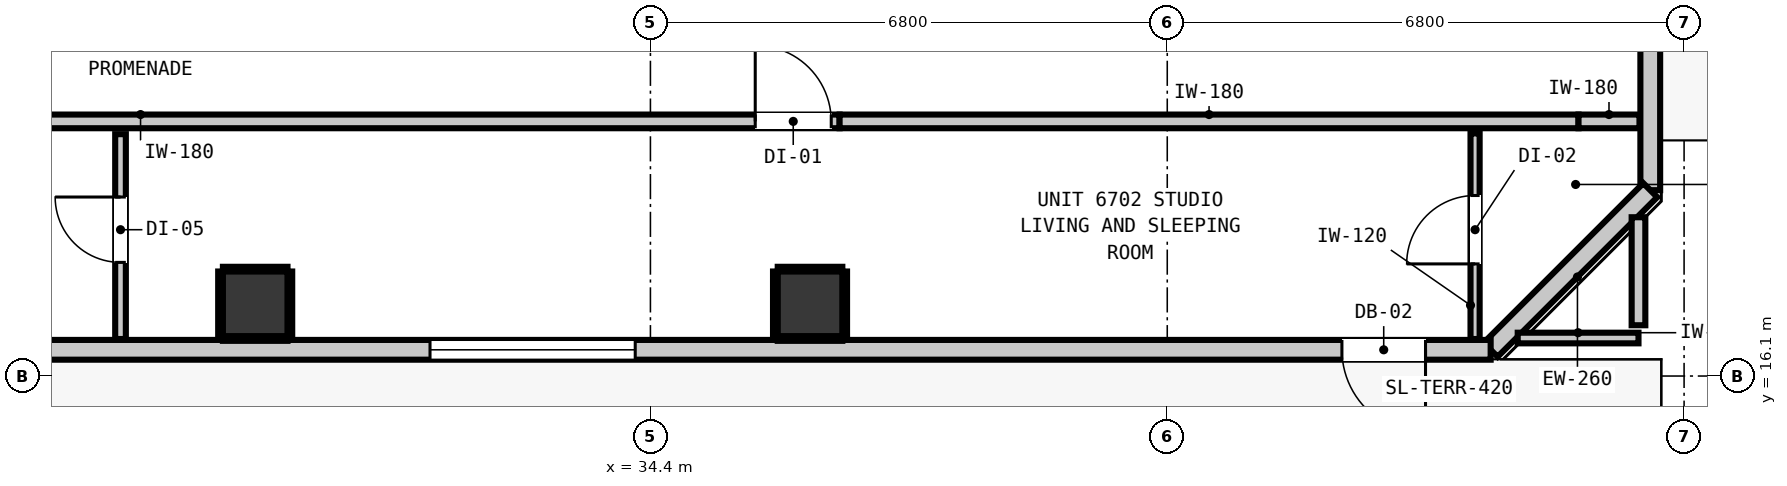
"""IFC4 building model, lengths in metres.
Left out: names, types, materials, properties, quantities, classifications, styles, units other than length and angle.
Written with IfcOpenShell. Run it as: python <this file> out.ifc"""

import sys

from ifc_helpers import new_model, si_unit, direction, frame, frame_2d, origin, origin_2d, place, context, subcontext, project, spatial, rectangle, extrude, element, fill, save


model = new_model("IFC4")
c1 = context("Model", 3, precision=1e-05, world=origin(), true_north=direction((0.0, 1.0)))
c2 = subcontext(c1, "Body", "Model", "MODEL_VIEW")
j1 = project(units=[si_unit("LENGTHUNIT", "METRE"), si_unit("PLANEANGLEUNIT", "RADIAN")], contexts=[c1])
p1 = place(None, origin())
s1 = spatial("IfcSite", under=j1, at=p1, CompositionType="ELEMENT")
p2 = place(p1, origin())
s2 = spatial("IfcBuilding", under=s1, at=p2, CompositionType="ELEMENT")
p3 = place(p2, frame((0.0, 0.0, 231.28)))
s3 = spatial("IfcBuildingStorey", under=s2, at=p3, CompositionType="ELEMENT", Elevation=231.28)
for number, where, z_axis, x_axis in (
    (1, (29.2, 17.05, -0.2), (0.0, 0.0, 1.0), (1.0, 0.0, 0.0)),
    (2, (36.5, 17.05, -0.2), (0.0, 0.0, 1.0), (1.0, 0.0, 0.0)),
):
    element("IfcColumn", number, at=place(p3, frame(where, z_axis=z_axis, x_axis=x_axis)), inside=s3, PredefinedType="COLUMN", context=c2, shape_type="SweptSolid", body=[
        extrude(rectangle(XDim=0.85, YDim=0.85, at=origin_2d()), origin(), (0.0, 0.0, 1.0), 3.52),
    ])
p4 = place(p3, frame((47.555, 48.855, 0.0), z_axis=(0.0, 0.0, 1.0), x_axis=(0.0, -1.0, 0.0)))
e3 = element("IfcWall", 3, at=p4, inside=s3, PredefinedType="STANDARD", context=c2, shape_type="SweptSolid", body=[
    extrude(rectangle(XDim=30.31, YDim=0.26, at=frame_2d((15.155, 0.0))), origin(), (0.0, 0.0, 1.0), 3.1),
])
p5 = place(p4, frame((0.91, 0.0, 0.0)))
e4 = element("IfcOpeningElement", 4, at=p5, cuts=e3, PredefinedType="OPENING", context=c2, shape_type="SweptSolid", body=[
    extrude(rectangle(XDim=1.0, YDim=2.15, at=frame_2d((0.5, 1.075))), frame((0.0, 0.14, 0.0), z_axis=(0.0, -1.0, 0.0), x_axis=(1.0, 0.0, 0.0)), (0.0, 0.0, 1.0), 0.28),
])
p6 = place(p4, frame((3.107, 0.0, 0.85)))
e5 = element("IfcOpeningElement", 5, at=p6, cuts=e3, PredefinedType="OPENING", context=c2, shape_type="SweptSolid", body=[
    extrude(rectangle(XDim=2.7, YDim=2.0, at=frame_2d((1.35, 1.0))), frame((0.0, 0.14, 0.0), z_axis=(0.0, -1.0, 0.0), x_axis=(1.0, 0.0, 0.0)), (0.0, 0.0, 1.0), 0.28),
])
p7 = place(p3, frame((47.555, 18.545, 0.0), z_axis=(0.0, 0.0, 1.0), x_axis=(-0.707106781187, -0.707106781187, 0.0)))
e6 = element("IfcWall", 6, at=p7, inside=s3, PredefinedType="STANDARD", context=c2, shape_type="SweptSolid", body=[
    extrude(rectangle(XDim=2.97, YDim=0.26, at=frame_2d((1.485, 0.0))), origin(), (0.0, 0.0, 1.0), 3.1),
])
p8 = place(p3, frame((45.455, 16.445, 0.0), z_axis=(0.0, 0.0, 1.0), x_axis=(-1.0, 0.0, 0.0)))
e7 = element("IfcWall", 7, at=p8, inside=s3, PredefinedType="STANDARD", context=c2, shape_type="SweptSolid", body=[
    extrude(rectangle(XDim=32.71, YDim=0.26, at=frame_2d((16.355, 0.0))), origin(), (0.0, 0.0, 1.0), 3.1),
])
p9 = place(p8, frame((0.857, 0.0, 0.0)))
e8 = element("IfcOpeningElement", 8, at=p9, cuts=e7, PredefinedType="OPENING", context=c2, shape_type="SweptSolid", body=[
    extrude(rectangle(XDim=1.1, YDim=2.15, at=frame_2d((0.55, 1.075))), frame((0.0, 0.14, 0.0), z_axis=(0.0, -1.0, 0.0), x_axis=(1.0, 0.0, 0.0)), (0.0, 0.0, 1.0), 0.28),
])
p10 = place(p8, frame((26.377, 0.0, 0.85)))
e9 = element("IfcOpeningElement", 9, at=p10, cuts=e7, PredefinedType="OPENING", context=c2, shape_type="SweptSolid", body=[
    extrude(rectangle(XDim=2.7, YDim=2.0, at=frame_2d((1.35, 1.0))), frame((0.0, 0.14, 0.0), z_axis=(0.0, -1.0, 0.0), x_axis=(1.0, 0.0, 0.0)), (0.0, 0.0, 1.0), 0.28),
])
p11 = place(p8, frame((11.255, 0.0, 0.85)))
e10 = element("IfcOpeningElement", 10, at=p11, cuts=e7, PredefinedType="OPENING", context=c2, shape_type="SweptSolid", body=[
    extrude(rectangle(XDim=2.7, YDim=2.0, at=frame_2d((1.35, 1.0))), frame((0.0, 0.14, 0.0), z_axis=(0.0, -1.0, 0.0), x_axis=(1.0, 0.0, 0.0)), (0.0, 0.0, 1.0), 0.28),
])
p12 = place(p3, frame((10.787, 19.45, 0.0), z_axis=(0.0, 0.0, 1.0), x_axis=(1.0, 0.0, 0.0)))
e11 = element("IfcWall", 11, at=p12, inside=s3, PredefinedType="PARTITIONING", context=c2, shape_type="SweptSolid", body=[
    extrude(rectangle(XDim=26.102, YDim=0.18, at=frame_2d((13.051, 0.0))), origin(), (0.0, 0.0, 1.0), 3.1),
])
p13 = place(p12, frame((7.817, 0.0, 0.0)))
e12 = element("IfcOpeningElement", 12, at=p13, cuts=e11, PredefinedType="OPENING", context=c2, shape_type="SweptSolid", body=[
    extrude(rectangle(XDim=1.0, YDim=2.15, at=frame_2d((0.5, 1.075))), frame((0.0, 0.1, 0.0), z_axis=(0.0, -1.0, 0.0), x_axis=(1.0, 0.0, 0.0)), (0.0, 0.0, 1.0), 0.2),
])
p14 = place(p12, frame((24.992, 0.0, 0.0)))
e13 = element("IfcOpeningElement", 13, at=p14, cuts=e11, PredefinedType="OPENING", context=c2, shape_type="SweptSolid", body=[
    extrude(rectangle(XDim=1.0, YDim=2.15, at=frame_2d((0.5, 1.075))), frame((0.0, 0.1, 0.0), z_axis=(0.0, -1.0, 0.0), x_axis=(1.0, 0.0, 0.0)), (0.0, 0.0, 1.0), 0.2),
])
p15 = place(p3, frame((36.889, 19.45, 0.0), z_axis=(0.0, 0.0, 1.0), x_axis=(1.0, 0.0, 0.0)))
e14 = element("IfcWall", 14, at=p15, inside=s3, PredefinedType="PARTITIONING", context=c2, shape_type="SweptSolid", body=[
    extrude(rectangle(XDim=9.722, YDim=0.18, at=frame_2d((4.861, 0.0))), origin(), (0.0, 0.0, 1.0), 2.477),
])
p16 = place(p3, frame((46.611, 19.45, 0.0), z_axis=(0.0, 0.0, 1.0), x_axis=(1.0, 0.0, 0.0)))
e15 = element("IfcWall", 15, at=p16, inside=s3, PredefinedType="PARTITIONING", context=c2, shape_type="SweptSolid", body=[
    extrude(rectangle(XDim=0.802, YDim=0.18, at=frame_2d((0.401, 0.0))), origin(), (0.0, 0.0, 1.0), 3.1),
])
p17 = place(p3, frame((45.811, 16.6, 0.0), z_axis=(0.0, 0.0, 1.0), x_axis=(1.0, 0.0, 0.0)))
e16 = element("IfcWall", 16, at=p17, inside=s3, PredefinedType="PARTITIONING", context=c2, shape_type="SweptSolid", body=[
    extrude(rectangle(XDim=1.589, YDim=0.14, at=frame_2d((0.794, 0.0))), origin(), (0.0, 0.0, 1.0), 3.1),
])
p18 = place(p3, frame((47.4, 16.768, 0.0), z_axis=(0.0, 0.0, 1.0), x_axis=(0.0, 1.0, 0.0)))
e17 = element("IfcWall", 17, at=p18, inside=s3, PredefinedType="PARTITIONING", context=c2, shape_type="SweptSolid", body=[
    extrude(rectangle(XDim=1.421, YDim=0.18, at=frame_2d((0.71, 0.0))), origin(), (0.0, 0.0, 1.0), 3.1),
])
p19 = place(p3, frame((27.428, 16.587, 0.0), z_axis=(0.0, 0.0, 1.0), x_axis=(0.0, 1.0, 0.0)))
e18 = element("IfcWall", 18, at=p19, inside=s3, PredefinedType="PARTITIONING", context=c2, shape_type="SweptSolid", body=[
    extrude(rectangle(XDim=2.695, YDim=0.14, at=frame_2d((1.348, 0.0))), origin(), (0.0, 0.0, 1.0), 3.1),
])
p20 = place(p19, frame((1.008, 0.0, 0.0)))
e19 = element("IfcOpeningElement", 19, at=p20, cuts=e18, PredefinedType="OPENING", context=c2, shape_type="SweptSolid", body=[
    extrude(rectangle(XDim=0.86, YDim=2.02, at=frame_2d((0.43, 1.01))), frame((0.0, 0.08, 0.0), z_axis=(0.0, -1.0, 0.0), x_axis=(1.0, 0.0, 0.0)), (0.0, 0.0, 1.0), 0.16),
])
p21 = place(p3, frame((45.25, 16.587, 0.0), z_axis=(0.0, 0.0, 1.0), x_axis=(0.0, 1.0, 0.0)))
e20 = element("IfcWall", 20, at=p21, inside=s3, PredefinedType="PARTITIONING", context=c2, shape_type="SweptSolid", body=[
    extrude(rectangle(XDim=2.705, YDim=0.12, at=frame_2d((1.353, 0.0))), origin(), (0.0, 0.0, 1.0), 3.1),
])
p22 = place(p21, frame((0.988, 0.0, 0.0)))
e21 = element("IfcOpeningElement", 21, at=p22, cuts=e20, PredefinedType="OPENING", context=c2, shape_type="SweptSolid", body=[
    extrude(rectangle(XDim=0.9, YDim=2.1, at=frame_2d((0.45, 1.05))), frame((0.0, 0.07, 0.0), z_axis=(0.0, -1.0, 0.0), x_axis=(1.0, 0.0, 0.0)), (0.0, 0.0, 1.0), 0.14),
])
for number, where, z_axis, x_axis in (
    (22, (28.775, 16.593, 0.0), (0.0, 0.0, 1.0), (1.0, 0.0, 0.0)),
    (23, (28.775, 17.507, 0.0), (0.0, 0.0, 1.0), (1.0, 0.0, 0.0)),
    (24, (28.743, 16.625, 0.0), (0.0, 0.0, 1.0), (0.0, 1.0, 0.0)),
    (25, (29.657, 16.625, 0.0), (0.0, 0.0, 1.0), (0.0, 1.0, 0.0)),
    (26, (36.075, 16.593, 0.0), (0.0, 0.0, 1.0), (1.0, 0.0, 0.0)),
    (27, (36.075, 17.507, 0.0), (0.0, 0.0, 1.0), (1.0, 0.0, 0.0)),
    (28, (36.043, 16.625, 0.0), (0.0, 0.0, 1.0), (0.0, 1.0, 0.0)),
    (29, (36.957, 16.625, 0.0), (0.0, 0.0, 1.0), (0.0, 1.0, 0.0)),
):
    element("IfcWall", number, at=place(p3, frame(where, z_axis=z_axis, x_axis=x_axis)), inside=s3, PredefinedType="PARTITIONING", context=c2, shape_type="SweptSolid", body=[
        extrude(rectangle(XDim=0.85, YDim=0.06, at=frame_2d((0.425, 0.0))), origin(), (0.0, 0.0, 1.0), 1.45),
    ])
p23 = place(p9, origin())
e30 = element("IfcDoor", 30, at=p23, inside=s3, OperationType="SINGLE_SWING_LEFT", PredefinedType="DOOR", context=c2, shape_type="SweptSolid", body=[
    extrude(rectangle(XDim=1.1, YDim=2.15, at=frame_2d((0.55, 1.075))), frame((0.0, 0.025, 0.0), z_axis=(0.0, -1.0, 0.0), x_axis=(1.0, 0.0, 0.0)), (0.0, 0.0, 1.0), 0.05),
])
fill(e8, e30)
p24 = place(p11, origin())
e31 = element("IfcWindow", 31, at=p24, inside=s3, PartitioningType="SINGLE_PANEL", PredefinedType="WINDOW", context=c2, shape_type="SweptSolid", body=[
    extrude(rectangle(XDim=2.7, YDim=2.0, at=frame_2d((1.35, 1.0))), frame((0.0, 0.03, 0.0), z_axis=(0.0, -1.0, 0.0), x_axis=(1.0, 0.0, 0.0)), (0.0, 0.0, 1.0), 0.06),
])
fill(e10, e31)
p25 = place(p14, origin())
e32 = element("IfcDoor", 32, at=p25, inside=s3, OperationType="SINGLE_SWING_LEFT", PredefinedType="DOOR", context=c2, shape_type="SweptSolid", body=[
    extrude(rectangle(XDim=1.0, YDim=2.15, at=frame_2d((0.5, 1.075))), frame((0.0, 0.025, 0.0), z_axis=(0.0, -1.0, 0.0), x_axis=(1.0, 0.0, 0.0)), (0.0, 0.0, 1.0), 0.05),
])
fill(e13, e32)
p26 = place(p20, origin())
e33 = element("IfcDoor", 33, at=p26, inside=s3, OperationType="SINGLE_SWING_RIGHT", PredefinedType="DOOR", context=c2, shape_type="SweptSolid", body=[
    extrude(rectangle(XDim=0.86, YDim=2.02, at=frame_2d((0.43, 1.01))), frame((0.0, 0.025, 0.0), z_axis=(0.0, -1.0, 0.0), x_axis=(1.0, 0.0, 0.0)), (0.0, 0.0, 1.0), 0.05),
])
fill(e19, e33)
p27 = place(p22, origin())
e34 = element("IfcDoor", 34, at=p27, inside=s3, OperationType="SINGLE_SWING_LEFT", PredefinedType="DOOR", context=c2, shape_type="SweptSolid", body=[
    extrude(rectangle(XDim=0.9, YDim=2.1, at=frame_2d((0.45, 1.05))), frame((0.0, 0.025, 0.0), z_axis=(0.0, -1.0, 0.0), x_axis=(1.0, 0.0, 0.0)), (0.0, 0.0, 1.0), 0.05),
])
fill(e21, e34)
save(model, sys.argv[1])
